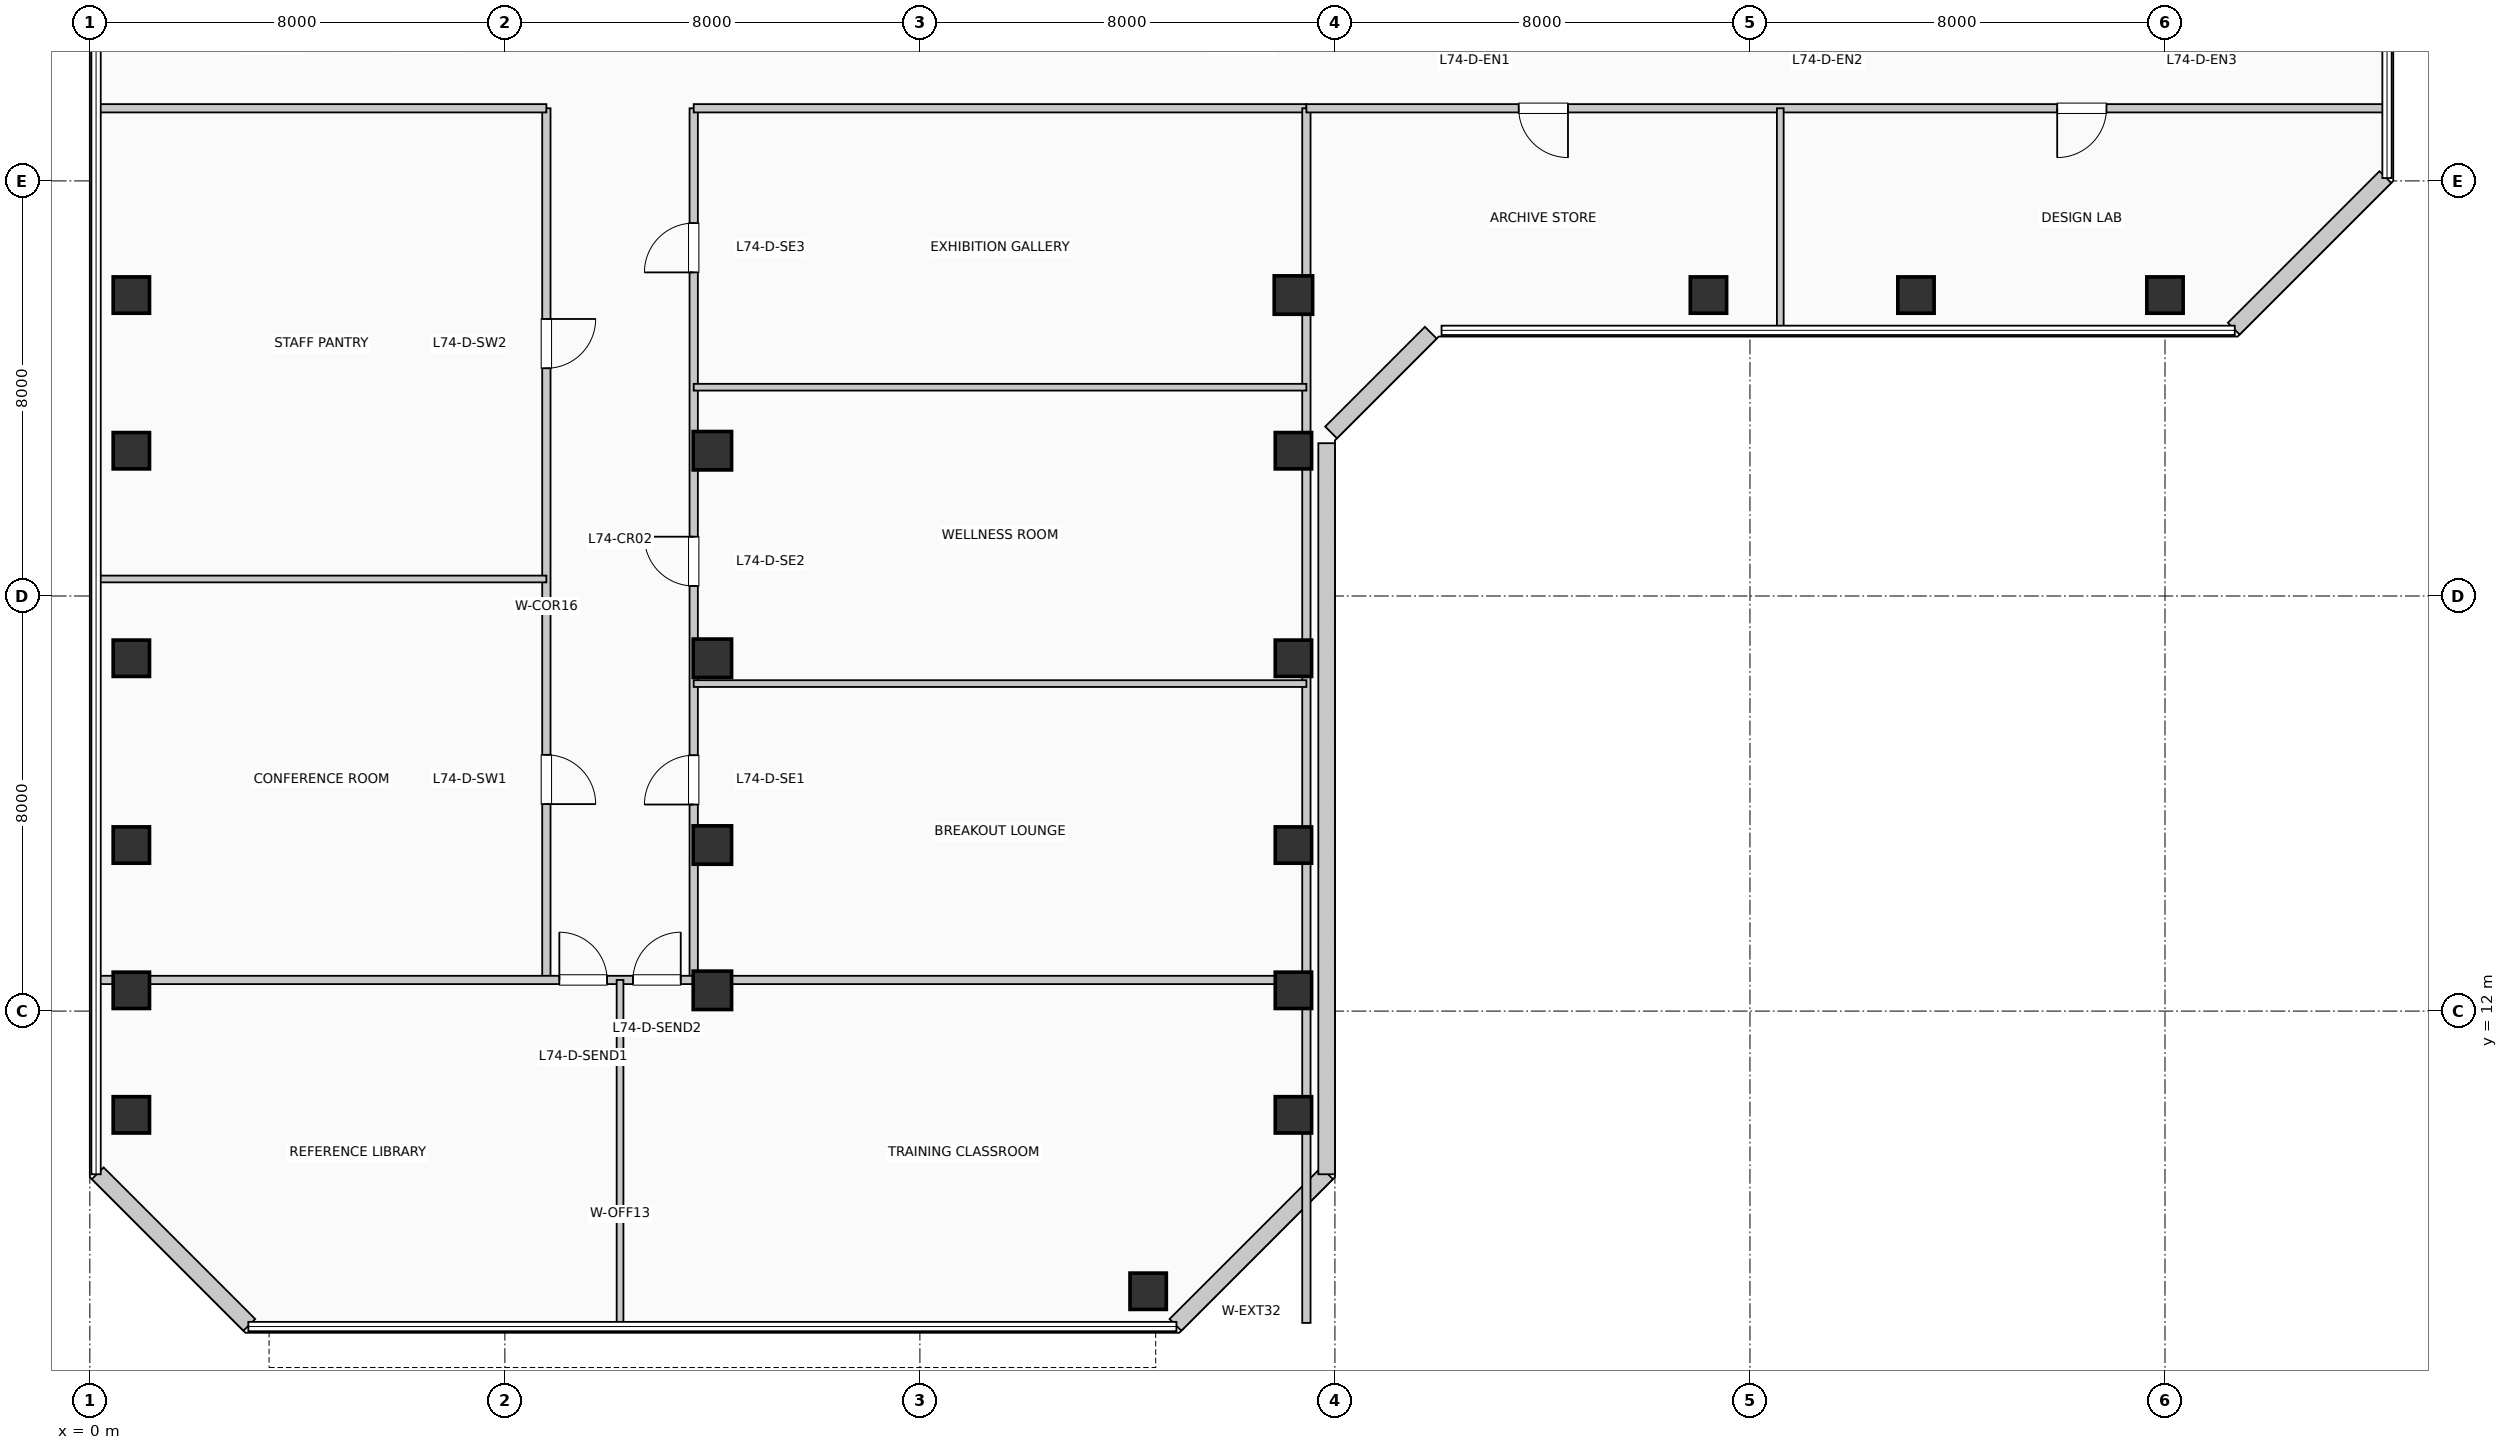
"""IFC4 building model, lengths in metres.
Left out: names, types, materials, properties, quantities, classifications, styles, units other than length and angle.
Written with IfcOpenShell. Run it as: python <this file> out.ifc"""

import sys

from ifc_helpers import new_model, si_unit, direction, frame, frame_2d, origin, origin_2d, place, context, subcontext, project, spatial, rectangle, extrude, element, fill, save


model = new_model("IFC4")
c1 = context("Model", 3, precision=1e-05, world=origin(), true_north=direction((0.0, 1.0)))
c2 = subcontext(c1, "Body", "Model", "MODEL_VIEW")
j1 = project(units=[si_unit("LENGTHUNIT", "METRE"), si_unit("PLANEANGLEUNIT", "RADIAN")], contexts=[c1])
p1 = place(None, origin())
s1 = spatial("IfcSite", under=j1, at=p1, CompositionType="ELEMENT")
p2 = place(p1, origin())
s2 = spatial("IfcBuilding", under=s1, at=p2, CompositionType="ELEMENT")
p3 = place(p2, frame((0.0, 0.0, 303.93)))
s3 = spatial("IfcBuildingStorey", under=s2, at=p3, CompositionType="ELEMENT", Elevation=303.93)
for number, where, z_axis, x_axis in (
    (1, (0.8, 10.0, 0.0), (0.0, 0.0, 1.0), (1.0, 0.0, 0.0)),
    (2, (0.8, 12.4, 0.0), (0.0, 0.0, 1.0), (1.0, 0.0, 0.0)),
    (3, (0.8, 15.2, 0.0), (0.0, 0.0, 1.0), (1.0, 0.0, 0.0)),
    (4, (0.8, 18.8, 0.0), (0.0, 0.0, 1.0), (1.0, 0.0, 0.0)),
    (5, (0.8, 22.8, 0.0), (0.0, 0.0, 1.0), (1.0, 0.0, 0.0)),
    (6, (0.8, 25.8, 0.0), (0.0, 0.0, 1.0), (1.0, 0.0, 0.0)),
):
    element("IfcColumn", number, at=place(p3, frame(where, z_axis=z_axis, x_axis=x_axis)), inside=s3, PredefinedType="COLUMN", context=c2, shape_type="SweptSolid", body=[
        extrude(rectangle(XDim=0.7, YDim=0.7, at=origin_2d()), origin(), (0.0, 0.0, 1.0), 3.96),
    ])
for number, where, z_axis, x_axis in (
    (7, (12.0, 12.4, 0.0), (0.0, 0.0, 1.0), (1.0, 0.0, 0.0)),
    (8, (12.0, 15.2, 0.0), (0.0, 0.0, 1.0), (1.0, 0.0, 0.0)),
    (9, (12.0, 18.8, 0.0), (0.0, 0.0, 1.0), (1.0, 0.0, 0.0)),
    (10, (12.0, 22.8, 0.0), (0.0, 0.0, 1.0), (1.0, 0.0, 0.0)),
):
    element("IfcColumn", number, at=place(p3, frame(where, z_axis=z_axis, x_axis=x_axis)), inside=s3, PredefinedType="COLUMN", context=c2, shape_type="SweptSolid", body=[
        extrude(rectangle(XDim=0.74, YDim=0.74, at=origin_2d()), origin(), (0.0, 0.0, 1.0), 3.96),
    ])
for number, where, z_axis, x_axis in (
    (11, (20.4, 6.6, 0.0), (0.0, 0.0, 1.0), (1.0, 0.0, 0.0)),
    (12, (23.2, 10.0, 0.0), (0.0, 0.0, 1.0), (1.0, 0.0, 0.0)),
    (13, (23.2, 12.4, 0.0), (0.0, 0.0, 1.0), (1.0, 0.0, 0.0)),
    (14, (23.2, 15.2, 0.0), (0.0, 0.0, 1.0), (1.0, 0.0, 0.0)),
    (15, (23.2, 18.8, 0.0), (0.0, 0.0, 1.0), (1.0, 0.0, 0.0)),
    (16, (23.2, 22.8, 0.0), (0.0, 0.0, 1.0), (1.0, 0.0, 0.0)),
):
    element("IfcColumn", number, at=place(p3, frame(where, z_axis=z_axis, x_axis=x_axis)), inside=s3, PredefinedType="COLUMN", context=c2, shape_type="SweptSolid", body=[
        extrude(rectangle(XDim=0.7, YDim=0.7, at=origin_2d()), origin(), (0.0, 0.0, 1.0), 3.96),
    ])
p4 = place(p3, frame((23.2, 25.8, 0.0), z_axis=(0.0, 0.0, 1.0), x_axis=(1.0, 0.0, 0.0)))
e17 = element("IfcColumn", 17, at=p4, inside=s3, PredefinedType="COLUMN", context=c2, shape_type="SweptSolid", body=[
    extrude(rectangle(XDim=0.74, YDim=0.74, at=origin_2d()), origin(), (0.0, 0.0, 1.0), 3.96),
])
for number, where, z_axis, x_axis in (
    (18, (31.2, 25.8, 0.0), (0.0, 0.0, 1.0), (1.0, 0.0, 0.0)),
    (19, (35.2, 25.8, 0.0), (0.0, 0.0, 1.0), (1.0, 0.0, 0.0)),
    (20, (40.0, 25.8, 0.0), (0.0, 0.0, 1.0), (1.0, 0.0, 0.0)),
):
    element("IfcColumn", number, at=place(p3, frame(where, z_axis=z_axis, x_axis=x_axis)), inside=s3, PredefinedType="COLUMN", context=c2, shape_type="SweptSolid", body=[
        extrude(rectangle(XDim=0.7, YDim=0.7, at=origin_2d()), origin(), (0.0, 0.0, 1.0), 3.96),
    ])
p5 = place(p3, frame((20.926, 5.952, 0.0), z_axis=(0.0, 0.0, 1.0), x_axis=(0.707077242712, 0.707136318428, 0.0)))
e21 = element("IfcWall", 21, at=p5, inside=s3, PredefinedType="SOLIDWALL", context=c2, shape_type="SweptSolid", body=[
    extrude(rectangle(XDim=4.133, YDim=0.32, at=frame_2d((2.066, 0.0))), origin(), (0.0, 0.0, 1.0), 3.74),
])
p6 = place(p3, frame((23.84, 8.855, 0.0), z_axis=(0.0, 0.0, 1.0), x_axis=(0.0, 1.0, 0.0)))
e22 = element("IfcWall", 22, at=p6, inside=s3, PredefinedType="SOLIDWALL", context=c2, shape_type="SweptSolid", body=[
    extrude(rectangle(XDim=14.09, YDim=0.32, at=frame_2d((7.045, 0.0))), origin(), (0.0, 0.0, 1.0), 3.74),
])
p7 = place(p3, frame((23.926, 23.152, 0.0), z_axis=(0.0, 0.0, 1.0), x_axis=(0.707106781187, 0.707106781187, 0.0)))
e23 = element("IfcWall", 23, at=p7, inside=s3, PredefinedType="SOLIDWALL", context=c2, shape_type="SweptSolid", body=[
    extrude(rectangle(XDim=2.718, YDim=0.32, at=frame_2d((1.359, 0.0))), origin(), (0.0, 0.0, 1.0), 3.74),
])
for number, where, z_axis, x_axis in (
    (24, (41.326, 25.152, 0.0), (0.0, 0.0, 1.0), (0.707, 0.707, 0.0)),
    (25, (0.152, 8.874, 0.0), (0.0, 0.0, 1.0), (0.707, -0.707, 0.0)),
):
    element("IfcWall", number, at=place(p3, frame(where, z_axis=z_axis, x_axis=x_axis)), inside=s3, PredefinedType="SOLIDWALL", context=c2, shape_type="SweptSolid", body=[
        extrude(rectangle(XDim=4.133, YDim=0.32, at=frame_2d((2.066, 0.0))), origin(), (0.0, 0.0, 1.0), 3.74),
    ])
p8 = place(p3, frame((8.8, 12.6, 0.0), z_axis=(0.0, 0.0, 1.0), x_axis=(0.0, 1.0, 0.0)))
e26 = element("IfcWall", 26, at=p8, inside=s3, PredefinedType="PARTITIONING", context=c2, shape_type="SweptSolid", body=[
    extrude(rectangle(XDim=16.8, YDim=0.16, at=frame_2d((8.4, 0.0))), origin(), (0.0, 0.0, 1.0), 3.74),
])
p9 = place(p8, frame((4.339, 0.0, 0.0), z_axis=(0.0, 0.0, 1.0), x_axis=(-1.0, 0.0, 0.0)))
e27 = element("IfcOpeningElement", 27, at=p9, cuts=e26, PredefinedType="OPENING", context=c2, shape_type="SweptSolid", body=[
    extrude(rectangle(XDim=0.95, YDim=2.15, at=frame_2d((0.475, 1.075))), frame((0.0, 0.09, 0.0), z_axis=(0.0, -1.0, 0.0), x_axis=(1.0, 0.0, 0.0)), (0.0, 0.0, 1.0), 0.18),
])
p10 = place(p8, frame((12.739, 0.0, 0.0), z_axis=(0.0, 0.0, 1.0), x_axis=(-1.0, 0.0, 0.0)))
e28 = element("IfcOpeningElement", 28, at=p10, cuts=e26, PredefinedType="OPENING", context=c2, shape_type="SweptSolid", body=[
    extrude(rectangle(XDim=0.95, YDim=2.15, at=frame_2d((0.475, 1.075))), frame((0.0, 0.09, 0.0), z_axis=(0.0, -1.0, 0.0), x_axis=(1.0, 0.0, 0.0)), (0.0, 0.0, 1.0), 0.18),
])
p11 = place(p3, frame((11.64, 12.6, 0.0), z_axis=(0.0, 0.0, 1.0), x_axis=(0.0, 1.0, 0.0)))
e29 = element("IfcWall", 29, at=p11, inside=s3, PredefinedType="PARTITIONING", context=c2, shape_type="SweptSolid", body=[
    extrude(rectangle(XDim=16.8, YDim=0.16, at=frame_2d((8.4, 0.0))), origin(), (0.0, 0.0, 1.0), 3.175),
])
p12 = place(p11, frame((3.381, 0.0, 0.0)))
e30 = element("IfcOpeningElement", 30, at=p12, cuts=e29, PredefinedType="OPENING", context=c2, shape_type="SweptSolid", body=[
    extrude(rectangle(XDim=0.95, YDim=2.15, at=frame_2d((0.475, 1.075))), frame((0.0, 0.09, 0.0), z_axis=(0.0, -1.0, 0.0), x_axis=(1.0, 0.0, 0.0)), (0.0, 0.0, 1.0), 0.18),
])
p13 = place(p11, frame((7.593, 0.0, 0.0)))
e31 = element("IfcOpeningElement", 31, at=p13, cuts=e29, PredefinedType="OPENING", context=c2, shape_type="SweptSolid", body=[
    extrude(rectangle(XDim=0.95, YDim=2.15, at=frame_2d((0.475, 1.075))), frame((0.0, 0.09, 0.0), z_axis=(0.0, -1.0, 0.0), x_axis=(1.0, 0.0, 0.0)), (0.0, 0.0, 1.0), 0.18),
])
p14 = place(p11, frame((13.637, 0.0, 0.0)))
e32 = element("IfcOpeningElement", 32, at=p14, cuts=e29, PredefinedType="OPENING", context=c2, shape_type="SweptSolid", body=[
    extrude(rectangle(XDim=0.95, YDim=2.15, at=frame_2d((0.475, 1.075))), frame((0.0, 0.09, 0.0), z_axis=(0.0, -1.0, 0.0), x_axis=(1.0, 0.0, 0.0)), (0.0, 0.0, 1.0), 0.18),
])
p15 = place(p3, frame((0.19, 12.6, 0.0), z_axis=(0.0, 0.0, 1.0), x_axis=(1.0, 0.0, 0.0)))
e33 = element("IfcWall", 33, at=p15, inside=s3, PredefinedType="PARTITIONING", context=c2, shape_type="SweptSolid", body=[
    extrude(rectangle(XDim=23.26, YDim=0.16, at=frame_2d((11.63, 0.0))), origin(), (0.0, 0.0, 1.0), 3.175),
])
p16 = place(p15, frame((8.86, 0.0, 0.0)))
e34 = element("IfcOpeningElement", 34, at=p16, cuts=e33, PredefinedType="OPENING", context=c2, shape_type="SweptSolid", body=[
    extrude(rectangle(XDim=0.92, YDim=2.1, at=frame_2d((0.46, 1.05))), frame((0.0, 0.09, 0.0), z_axis=(0.0, -1.0, 0.0), x_axis=(1.0, 0.0, 0.0)), (0.0, 0.0, 1.0), 0.18),
])
p17 = place(p15, frame((10.28, 0.0, 0.0)))
e35 = element("IfcOpeningElement", 35, at=p17, cuts=e33, PredefinedType="OPENING", context=c2, shape_type="SweptSolid", body=[
    extrude(rectangle(XDim=0.92, YDim=2.1, at=frame_2d((0.46, 1.05))), frame((0.0, 0.09, 0.0), z_axis=(0.0, -1.0, 0.0), x_axis=(1.0, 0.0, 0.0)), (0.0, 0.0, 1.0), 0.18),
])
p18 = place(p3, frame((0.19, 29.4, 0.0), z_axis=(0.0, 0.0, 1.0), x_axis=(1.0, 0.0, 0.0)))
e36 = element("IfcWall", 36, at=p18, inside=s3, PredefinedType="PARTITIONING", context=c2, shape_type="SweptSolid", body=[
    extrude(rectangle(XDim=8.61, YDim=0.16, at=frame_2d((4.305, 0.0))), origin(), (0.0, 0.0, 1.0), 3.425),
])
p19 = place(p3, frame((11.64, 29.4, 0.0), z_axis=(0.0, 0.0, 1.0), x_axis=(1.0, 0.0, 0.0)))
e37 = element("IfcWall", 37, at=p19, inside=s3, PredefinedType="PARTITIONING", context=c2, shape_type="SweptSolid", body=[
    extrude(rectangle(XDim=11.81, YDim=0.16, at=frame_2d((5.905, 0.0))), origin(), (0.0, 0.0, 1.0), 3.425),
])
p20 = place(p3, frame((23.45, 5.99, 0.0), z_axis=(0.0, 0.0, 1.0), x_axis=(0.0, 1.0, 0.0)))
e38 = element("IfcWall", 38, at=p20, inside=s3, PredefinedType="PARTITIONING", context=c2, shape_type="SweptSolid", body=[
    extrude(rectangle(XDim=23.41, YDim=0.16, at=frame_2d((11.705, 0.0))), origin(), (0.0, 0.0, 1.0), 3.175),
])
p21 = place(p3, frame((10.22, 5.99, 0.0), z_axis=(0.0, 0.0, 1.0), x_axis=(0.0, 1.0, 0.0)))
e39 = element("IfcWall", 39, at=p21, inside=s3, PredefinedType="PARTITIONING", context=c2, shape_type="SweptSolid", body=[
    extrude(rectangle(XDim=6.61, YDim=0.13, at=frame_2d((3.305, 0.0))), origin(), (0.0, 0.0, 1.0), 3.74),
])
p22 = place(p3, frame((0.19, 20.328, 0.0), z_axis=(0.0, 0.0, 1.0), x_axis=(1.0, 0.0, 0.0)))
e40 = element("IfcWall", 40, at=p22, inside=s3, PredefinedType="PARTITIONING", context=c2, shape_type="SweptSolid", body=[
    extrude(rectangle(XDim=8.61, YDim=0.13, at=frame_2d((4.305, 0.0))), origin(), (0.0, 0.0, 1.0), 3.74),
])
for number, where, z_axis, x_axis in (
    (41, (11.64, 18.312, 0.0), (0.0, 0.0, 1.0), (1.0, 0.0, 0.0)),
    (42, (11.64, 24.024, 0.0), (0.0, 0.0, 1.0), (1.0, 0.0, 0.0)),
):
    element("IfcWall", number, at=place(p3, frame(where, z_axis=z_axis, x_axis=x_axis)), inside=s3, PredefinedType="PARTITIONING", context=c2, shape_type="SweptSolid", body=[
        extrude(rectangle(XDim=11.81, YDim=0.13, at=frame_2d((5.905, 0.0))), origin(), (0.0, 0.0, 1.0), 3.74),
    ])
p23 = place(p3, frame((23.45, 29.4, 0.0), z_axis=(0.0, 0.0, 1.0), x_axis=(1.0, 0.0, 0.0)))
e43 = element("IfcWall", 43, at=p23, inside=s3, PredefinedType="PARTITIONING", context=c2, shape_type="SweptSolid", body=[
    extrude(rectangle(XDim=20.76, YDim=0.16, at=frame_2d((10.38, 0.0))), origin(), (0.0, 0.0, 1.0), 3.425),
])
p24 = place(p23, frame((5.042, 0.0, 0.0), z_axis=(0.0, 0.0, 1.0), x_axis=(-1.0, 0.0, 0.0)))
e44 = element("IfcOpeningElement", 44, at=p24, cuts=e43, PredefinedType="OPENING", context=c2, shape_type="SweptSolid", body=[
    extrude(rectangle(XDim=0.95, YDim=2.15, at=frame_2d((0.475, 1.075))), frame((0.0, 0.09, 0.0), z_axis=(0.0, -1.0, 0.0), x_axis=(1.0, 0.0, 0.0)), (0.0, 0.0, 1.0), 0.18),
])
p25 = place(p23, frame((15.422, 0.0, 0.0), z_axis=(0.0, 0.0, 1.0), x_axis=(-1.0, 0.0, 0.0)))
e45 = element("IfcOpeningElement", 45, at=p25, cuts=e43, PredefinedType="OPENING", context=c2, shape_type="SweptSolid", body=[
    extrude(rectangle(XDim=0.95, YDim=2.15, at=frame_2d((0.475, 1.075))), frame((0.0, 0.09, 0.0), z_axis=(0.0, -1.0, 0.0), x_axis=(1.0, 0.0, 0.0)), (0.0, 0.0, 1.0), 0.18),
])
p26 = place(p3, frame((32.584, 25.19, 0.0), z_axis=(0.0, 0.0, 1.0), x_axis=(0.0, 1.0, 0.0)))
e46 = element("IfcWall", 46, at=p26, inside=s3, PredefinedType="PARTITIONING", context=c2, shape_type="SweptSolid", body=[
    extrude(rectangle(XDim=4.21, YDim=0.13, at=frame_2d((2.105, 0.0))), origin(), (0.0, 0.0, 1.0), 3.74),
])
p27 = place(p16, origin())
e47 = element("IfcDoor", 47, at=p27, inside=s3, OperationType="SINGLE_SWING_LEFT", PredefinedType="DOOR", context=c2, shape_type="SweptSolid", body=[
    extrude(rectangle(XDim=0.92, YDim=2.1, at=frame_2d((0.46, 1.05))), frame((0.0, 0.025, 0.0), z_axis=(0.0, -1.0, 0.0), x_axis=(1.0, 0.0, 0.0)), (0.0, 0.0, 1.0), 0.05),
])
fill(e34, e47)
p28 = place(p17, origin())
e48 = element("IfcDoor", 48, at=p28, inside=s3, OperationType="SINGLE_SWING_RIGHT", PredefinedType="DOOR", context=c2, shape_type="SweptSolid", body=[
    extrude(rectangle(XDim=0.92, YDim=2.1, at=frame_2d((0.46, 1.05))), frame((0.0, 0.025, 0.0), z_axis=(0.0, -1.0, 0.0), x_axis=(1.0, 0.0, 0.0)), (0.0, 0.0, 1.0), 0.05),
])
fill(e35, e48)
p29 = place(p9, origin())
e49 = element("IfcDoor", 49, at=p29, inside=s3, OperationType="SINGLE_SWING_LEFT", PredefinedType="DOOR", context=c2, shape_type="SweptSolid", body=[
    extrude(rectangle(XDim=0.95, YDim=2.15, at=frame_2d((0.475, 1.075))), frame((0.0, 0.025, 0.0), z_axis=(0.0, -1.0, 0.0), x_axis=(1.0, 0.0, 0.0)), (0.0, 0.0, 1.0), 0.05),
])
fill(e27, e49)
p30 = place(p10, origin())
e50 = element("IfcDoor", 50, at=p30, inside=s3, OperationType="SINGLE_SWING_RIGHT", PredefinedType="DOOR", context=c2, shape_type="SweptSolid", body=[
    extrude(rectangle(XDim=0.95, YDim=2.15, at=frame_2d((0.475, 1.075))), frame((0.0, 0.025, 0.0), z_axis=(0.0, -1.0, 0.0), x_axis=(1.0, 0.0, 0.0)), (0.0, 0.0, 1.0), 0.05),
])
fill(e28, e50)
p31 = place(p12, origin())
e51 = element("IfcDoor", 51, at=p31, inside=s3, OperationType="SINGLE_SWING_LEFT", PredefinedType="DOOR", context=c2, shape_type="SweptSolid", body=[
    extrude(rectangle(XDim=0.95, YDim=2.15, at=frame_2d((0.475, 1.075))), frame((0.0, 0.025, 0.0), z_axis=(0.0, -1.0, 0.0), x_axis=(1.0, 0.0, 0.0)), (0.0, 0.0, 1.0), 0.05),
])
fill(e30, e51)
p32 = place(p13, origin())
e52 = element("IfcDoor", 52, at=p32, inside=s3, OperationType="SINGLE_SWING_RIGHT", PredefinedType="DOOR", context=c2, shape_type="SweptSolid", body=[
    extrude(rectangle(XDim=0.95, YDim=2.15, at=frame_2d((0.475, 1.075))), frame((0.0, 0.025, 0.0), z_axis=(0.0, -1.0, 0.0), x_axis=(1.0, 0.0, 0.0)), (0.0, 0.0, 1.0), 0.05),
])
fill(e31, e52)
p33 = place(p14, origin())
e53 = element("IfcDoor", 53, at=p33, inside=s3, OperationType="SINGLE_SWING_LEFT", PredefinedType="DOOR", context=c2, shape_type="SweptSolid", body=[
    extrude(rectangle(XDim=0.95, YDim=2.15, at=frame_2d((0.475, 1.075))), frame((0.0, 0.025, 0.0), z_axis=(0.0, -1.0, 0.0), x_axis=(1.0, 0.0, 0.0)), (0.0, 0.0, 1.0), 0.05),
])
fill(e32, e53)
p34 = place(p24, origin())
e54 = element("IfcDoor", 54, at=p34, inside=s3, OperationType="SINGLE_SWING_RIGHT", PredefinedType="DOOR", context=c2, shape_type="SweptSolid", body=[
    extrude(rectangle(XDim=0.95, YDim=2.15, at=frame_2d((0.475, 1.075))), frame((0.0, 0.025, 0.0), z_axis=(0.0, -1.0, 0.0), x_axis=(1.0, 0.0, 0.0)), (0.0, 0.0, 1.0), 0.05),
])
fill(e44, e54)
p35 = place(p25, origin())
e55 = element("IfcDoor", 55, at=p35, inside=s3, OperationType="SINGLE_SWING_LEFT", PredefinedType="DOOR", context=c2, shape_type="SweptSolid", body=[
    extrude(rectangle(XDim=0.95, YDim=2.15, at=frame_2d((0.475, 1.075))), frame((0.0, 0.025, 0.0), z_axis=(0.0, -1.0, 0.0), x_axis=(1.0, 0.0, 0.0)), (0.0, 0.0, 1.0), 0.05),
])
fill(e45, e55)
save(model, sys.argv[1])
